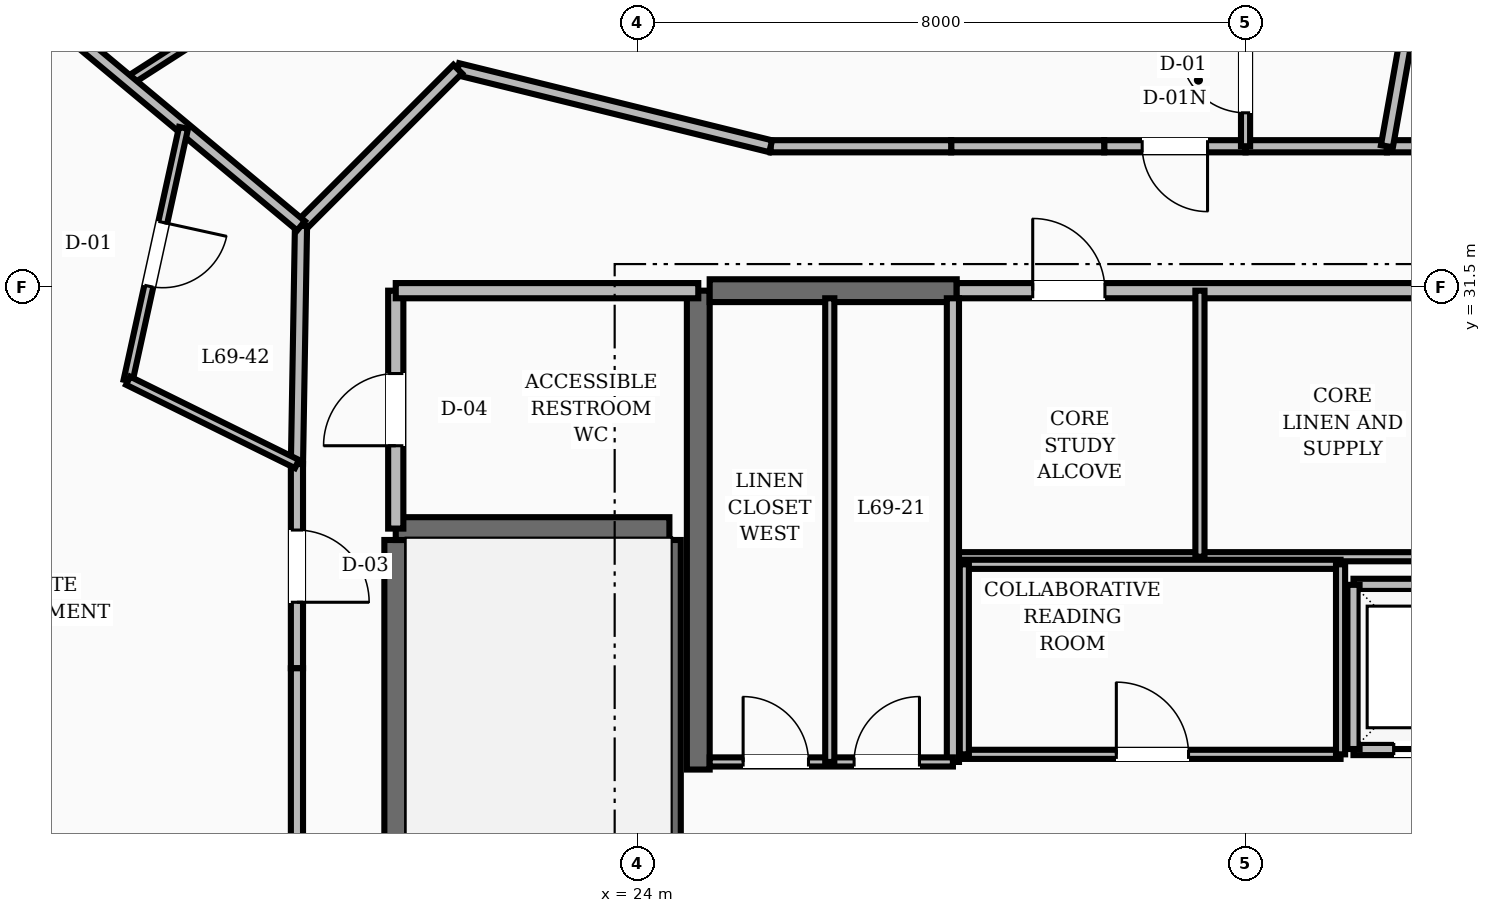
"""IFC4 building model, lengths in metres.
Left out: names, types, materials, properties, quantities, classifications, styles, units other than length and angle.
Written with IfcOpenShell. Run it as: python <this file> out.ifc"""

import sys

from ifc_helpers import new_model, si_unit, direction, frame, frame_2d, origin, place, context, subcontext, project, spatial, rectangle, extrude, element, fill, save


model = new_model("IFC4")
c1 = context("Model", 3, precision=1e-05, world=origin(), true_north=direction((0.0, 1.0)))
c2 = subcontext(c1, "Body", "Model", "MODEL_VIEW")
j1 = project(units=[si_unit("LENGTHUNIT", "METRE"), si_unit("PLANEANGLEUNIT", "RADIAN")], contexts=[c1])
p1 = place(None, origin())
s1 = spatial("IfcSite", under=j1, at=p1, CompositionType="ELEMENT")
p2 = place(p1, origin())
s2 = spatial("IfcBuilding", under=s1, at=p2, CompositionType="ELEMENT")
p3 = place(p2, frame((0.0, 0.0, 265.2)))
s3 = spatial("IfcBuildingStorey", under=s2, at=p3, CompositionType="ELEMENT", Elevation=265.2)
p4 = place(p3, frame((24.8, 25.15, 0.0), z_axis=(0.0, 0.0, 1.0), x_axis=(0.0, 1.0, 0.0)))
e1 = element("IfcWall", 1, at=p4, inside=s3, PredefinedType="SHEAR", context=c2, shape_type="SweptSolid", body=[
    extrude(rectangle(XDim=6.3, YDim=0.3, at=frame_2d((3.15, 0.0))), origin(), (0.0, 0.0, 1.0), 3.6),
])
p5 = place(p3, frame((24.95, 31.45, 0.0), z_axis=(0.0, 0.0, 1.0), x_axis=(1.0, 0.0, 0.0)))
e2 = element("IfcWall", 2, at=p5, inside=s3, PredefinedType="SHEAR", context=c2, shape_type="SweptSolid", body=[
    extrude(rectangle(XDim=3.25, YDim=0.3, at=frame_2d((1.625, 0.0))), origin(), (0.0, 0.0, 1.0), 3.6),
])
for number, where, z_axis, x_axis in (
    (3, (20.82, 19.43, 0.0), (0.0, 0.0, 1.0), (0.0, 1.0, 0.0)),
    (4, (24.42, 19.43, 0.0), (0.0, 0.0, 1.0), (0.0, 1.0, 0.0)),
):
    element("IfcWall", number, at=place(p3, frame(where, z_axis=z_axis, x_axis=x_axis)), inside=s3, PredefinedType="SHEAR", context=c2, shape_type="SweptSolid", body=[
        extrude(rectangle(XDim=8.74, YDim=0.3, at=frame_2d((4.37, 0.0))), origin(), (0.0, 0.0, 1.0), 3.6),
    ])
p6 = place(p3, frame((20.82, 28.32, 0.0), z_axis=(0.0, 0.0, 1.0), x_axis=(1.0, 0.0, 0.0)))
e5 = element("IfcWall", 5, at=p6, inside=s3, PredefinedType="SHEAR", context=c2, shape_type="SweptSolid", body=[
    extrude(rectangle(XDim=3.6, YDim=0.3, at=frame_2d((1.8, 0.0))), origin(), (0.0, 0.0, 1.0), 3.6),
])
p7 = place(p3, frame((20.82, 28.32, 0.0), z_axis=(0.0, 0.0, 1.0), x_axis=(0.0, 1.0, 0.0)))
e6 = element("IfcWall", 6, at=p7, inside=s3, PredefinedType="SOLIDWALL", context=c2, shape_type="SweptSolid", body=[
    extrude(rectangle(XDim=3.13, YDim=0.2, at=frame_2d((1.565, 0.0))), origin(), (0.0, 0.0, 1.0), 2.87),
])
p8 = place(p7, frame((1.09, 0.0, 0.0)))
e7 = element("IfcOpeningElement", 7, at=p8, cuts=e6, PredefinedType="OPENING", context=c2, shape_type="SweptSolid", body=[
    extrude(rectangle(XDim=0.95, YDim=2.1, at=frame_2d((0.475, 1.05))), frame((0.0, 0.11, 0.0), z_axis=(0.0, -1.0, 0.0), x_axis=(1.0, 0.0, 0.0)), (0.0, 0.0, 1.0), 0.22),
])
p9 = place(p3, frame((20.82, 31.45, 0.0), z_axis=(0.0, 0.0, 1.0), x_axis=(1.0, 0.0, 0.0)))
e8 = element("IfcWall", 8, at=p9, inside=s3, PredefinedType="SOLIDWALL", context=c2, shape_type="SweptSolid", body=[
    extrude(rectangle(XDim=3.98, YDim=0.2, at=frame_2d((1.99, 0.0))), origin(), (0.0, 0.0, 1.0), 2.87),
])
p10 = place(p3, frame((33.42, 25.42, 0.0), z_axis=(0.0, 0.0, 1.0), x_axis=(1.0, 0.0, 0.0)))
e9 = element("IfcWall", 9, at=p10, inside=s3, PredefinedType="SOLIDWALL", context=c2, shape_type="SweptSolid", body=[
    extrude(rectangle(XDim=2.16, YDim=0.16, at=frame_2d((1.08, 0.0))), origin(), (0.0, 0.0, 1.0), 2.87),
])
p11 = place(p10, frame((0.53, 0.0, 0.0)))
e10 = element("IfcOpeningElement", 10, at=p11, cuts=e9, PredefinedType="OPENING", context=c2, shape_type="SweptSolid", body=[
    extrude(rectangle(XDim=1.1, YDim=2.15, at=frame_2d((0.55, 1.075))), frame((0.0, 0.09, 0.0), z_axis=(0.0, -1.0, 0.0), x_axis=(1.0, 0.0, 0.0)), (0.0, 0.0, 1.0), 0.18),
])
for number, where, z_axis, x_axis in (
    (11, (33.42, 27.58, 0.0), (0.0, 0.0, 1.0), (1.0, 0.0, 0.0)),
    (12, (33.42, 25.42, 0.0), (0.0, 0.0, 1.0), (0.0, 1.0, 0.0)),
):
    element("IfcWall", number, at=place(p3, frame(where, z_axis=z_axis, x_axis=x_axis)), inside=s3, PredefinedType="SOLIDWALL", context=c2, shape_type="SweptSolid", body=[
        extrude(rectangle(XDim=2.16, YDim=0.16, at=frame_2d((1.08, 0.0))), origin(), (0.0, 0.0, 1.0), 2.87),
    ])
p12 = place(p3, frame((28.2, 31.45, 0.0), z_axis=(0.0, 0.0, 1.0), x_axis=(1.0, 0.0, 0.0)))
e13 = element("IfcWall", 13, at=p12, inside=s3, PredefinedType="SOLIDWALL", context=c2, shape_type="SweptSolid", body=[
    extrude(rectangle(XDim=7.6, YDim=0.2, at=frame_2d((3.8, 0.0))), origin(), (0.0, 0.0, 1.0), 2.87),
])
p13 = place(p12, frame((1.0, 0.0, 0.0)))
e14 = element("IfcOpeningElement", 14, at=p13, cuts=e13, PredefinedType="OPENING", context=c2, shape_type="SweptSolid", body=[
    extrude(rectangle(XDim=0.95, YDim=2.1, at=frame_2d((0.475, 1.05))), frame((0.0, 0.11, 0.0), z_axis=(0.0, -1.0, 0.0), x_axis=(1.0, 0.0, 0.0)), (0.0, 0.0, 1.0), 0.22),
])
p14 = place(p3, frame((28.2, 27.95, 0.0), z_axis=(0.0, 0.0, 1.0), x_axis=(1.0, 0.0, 0.0)))
e15 = element("IfcWall", 15, at=p14, inside=s3, PredefinedType="PARTITIONING", context=c2, shape_type="SweptSolid", body=[
    extrude(rectangle(XDim=7.6, YDim=0.12, at=frame_2d((3.8, 0.0))), origin(), (0.0, 0.0, 1.0), 2.87),
])
p15 = place(p3, frame((31.4, 27.95, 0.0), z_axis=(0.0, 0.0, 1.0), x_axis=(0.0, 1.0, 0.0)))
e16 = element("IfcWall", 16, at=p15, inside=s3, PredefinedType="PARTITIONING", context=c2, shape_type="SweptSolid", body=[
    extrude(rectangle(XDim=3.5, YDim=0.12, at=frame_2d((1.75, 0.0))), origin(), (0.0, 0.0, 1.0), 2.87),
])
p16 = place(p3, frame((28.3, 25.35, 0.0), z_axis=(0.0, 0.0, 1.0), x_axis=(1.0, 0.0, 0.0)))
e17 = element("IfcWall", 17, at=p16, inside=s3, PredefinedType="PARTITIONING", context=c2, shape_type="SweptSolid", body=[
    extrude(rectangle(XDim=4.95, YDim=0.12, at=frame_2d((2.475, 0.0))), origin(), (0.0, 0.0, 1.0), 2.87),
])
p17 = place(p16, frame((2.0, 0.0, 0.0)))
e18 = element("IfcOpeningElement", 18, at=p17, cuts=e17, PredefinedType="OPENING", context=c2, shape_type="SweptSolid", body=[
    extrude(rectangle(XDim=0.95, YDim=2.1, at=frame_2d((0.475, 1.05))), frame((0.0, 0.07, 0.0), z_axis=(0.0, -1.0, 0.0), x_axis=(1.0, 0.0, 0.0)), (0.0, 0.0, 1.0), 0.14),
])
p18 = place(p3, frame((28.3, 27.85, 0.0), z_axis=(0.0, 0.0, 1.0), x_axis=(1.0, 0.0, 0.0)))
e19 = element("IfcWall", 19, at=p18, inside=s3, PredefinedType="PARTITIONING", context=c2, shape_type="SweptSolid", body=[
    extrude(rectangle(XDim=4.95, YDim=0.12, at=frame_2d((2.475, 0.0))), origin(), (0.0, 0.0, 1.0), 2.87),
])
for number, where, z_axis, x_axis in (
    (20, (28.3, 25.35, 0.0), (0.0, 0.0, 1.0), (0.0, 1.0, 0.0)),
    (21, (33.25, 25.35, 0.0), (0.0, 0.0, 1.0), (0.0, 1.0, 0.0)),
):
    element("IfcWall", number, at=place(p3, frame(where, z_axis=z_axis, x_axis=x_axis)), inside=s3, PredefinedType="PARTITIONING", context=c2, shape_type="SweptSolid", body=[
        extrude(rectangle(XDim=2.5, YDim=0.12, at=frame_2d((1.25, 0.0))), origin(), (0.0, 0.0, 1.0), 2.87),
    ])
p19 = place(p3, frame((28.15, 25.25, 0.0), z_axis=(0.0, 0.0, 1.0), x_axis=(0.0, 1.0, 0.0)))
e22 = element("IfcWall", 22, at=p19, inside=s3, PredefinedType="SOLIDWALL", context=c2, shape_type="SweptSolid", body=[
    extrude(rectangle(XDim=6.1, YDim=0.16, at=frame_2d((3.05, 0.0))), origin(), (0.0, 0.0, 1.0), 2.87),
])
p20 = place(p3, frame((24.95, 25.25, 0.0), z_axis=(0.0, 0.0, 1.0), x_axis=(1.0, 0.0, 0.0)))
e23 = element("IfcWall", 23, at=p20, inside=s3, PredefinedType="PARTITIONING", context=c2, shape_type="SweptSolid", body=[
    extrude(rectangle(XDim=3.2, YDim=0.12, at=frame_2d((1.6, 0.0))), origin(), (0.0, 0.0, 1.0), 2.87),
])
p21 = place(p20, frame((0.44, 0.0, 0.0)))
e24 = element("IfcOpeningElement", 24, at=p21, cuts=e23, PredefinedType="OPENING", context=c2, shape_type="SweptSolid", body=[
    extrude(rectangle(XDim=0.86, YDim=2.1, at=frame_2d((0.43, 1.05))), frame((0.0, 0.07, 0.0), z_axis=(0.0, -1.0, 0.0), x_axis=(1.0, 0.0, 0.0)), (0.0, 0.0, 1.0), 0.14),
])
p22 = place(p20, frame((1.9, 0.0, 0.0)))
e25 = element("IfcOpeningElement", 25, at=p22, cuts=e23, PredefinedType="OPENING", context=c2, shape_type="SweptSolid", body=[
    extrude(rectangle(XDim=0.86, YDim=2.1, at=frame_2d((0.43, 1.05))), frame((0.0, 0.07, 0.0), z_axis=(0.0, -1.0, 0.0), x_axis=(1.0, 0.0, 0.0)), (0.0, 0.0, 1.0), 0.14),
])
p23 = place(p3, frame((26.53, 25.25, 0.0), z_axis=(0.0, 0.0, 1.0), x_axis=(0.0, 1.0, 0.0)))
e26 = element("IfcWall", 26, at=p23, inside=s3, PredefinedType="PARTITIONING", context=c2, shape_type="SweptSolid", body=[
    extrude(rectangle(XDim=6.1, YDim=0.12, at=frame_2d((3.05, 0.0))), origin(), (0.0, 0.0, 1.0), 2.87),
])
p24 = place(p3, frame((35.873, 33.35, 0.0), z_axis=(0.0, 0.0, 1.0), x_axis=(-1.0, 0.0, 0.0)))
e27 = element("IfcWall", 27, at=p24, inside=s3, PredefinedType="SOLIDWALL", context=c2, shape_type="SweptSolid", body=[
    extrude(rectangle(XDim=2.013, YDim=0.16, at=frame_2d((1.006, 0.0))), origin(), (0.0, 0.0, 1.0), 2.87),
])
p25 = place(p3, frame((33.86, 33.35, 0.0), z_axis=(0.0, 0.0, 1.0), x_axis=(-1.0, 0.0, 0.0)))
e28 = element("IfcWall", 28, at=p25, inside=s3, PredefinedType="SOLIDWALL", context=c2, shape_type="SweptSolid", body=[
    extrude(rectangle(XDim=1.86, YDim=0.16, at=frame_2d((0.93, 0.0))), origin(), (0.0, 0.0, 1.0), 2.87),
])
p26 = place(p3, frame((32.0, 33.35, 0.0), z_axis=(0.0, 0.0, 1.0), x_axis=(-1.0, 0.0, 0.0)))
e29 = element("IfcWall", 29, at=p26, inside=s3, PredefinedType="SOLIDWALL", context=c2, shape_type="SweptSolid", body=[
    extrude(rectangle(XDim=1.86, YDim=0.16, at=frame_2d((0.93, 0.0))), origin(), (0.0, 0.0, 1.0), 2.87),
])
p27 = place(p26, frame((0.5, 0.0, 0.0)))
e30 = element("IfcOpeningElement", 30, at=p27, cuts=e29, PredefinedType="OPENING", context=c2, shape_type="SweptSolid", body=[
    extrude(rectangle(XDim=0.86, YDim=2.1, at=frame_2d((0.43, 1.05))), frame((0.0, 0.09, 0.0), z_axis=(0.0, -1.0, 0.0), x_axis=(1.0, 0.0, 0.0)), (0.0, 0.0, 1.0), 0.18),
])
p28 = place(p3, frame((30.14, 33.35, 0.0), z_axis=(0.0, 0.0, 1.0), x_axis=(-1.0, 0.0, 0.0)))
e31 = element("IfcWall", 31, at=p28, inside=s3, PredefinedType="SOLIDWALL", context=c2, shape_type="SweptSolid", body=[
    extrude(rectangle(XDim=2.013, YDim=0.16, at=frame_2d((1.006, 0.0))), origin(), (0.0, 0.0, 1.0), 2.87),
])
p29 = place(p3, frame((28.127, 33.35, 0.0), z_axis=(0.0, 0.0, 1.0), x_axis=(-1.0, 0.0, 0.0)))
e32 = element("IfcWall", 32, at=p29, inside=s3, PredefinedType="SOLIDWALL", context=c2, shape_type="SweptSolid", body=[
    extrude(rectangle(XDim=2.375, YDim=0.16, at=frame_2d((1.188, 0.0))), origin(), (0.0, 0.0, 1.0), 2.87),
])
p30 = place(p3, frame((25.752, 33.35, 0.0), z_axis=(0.0, 0.0, 1.0), x_axis=(-0.970939799552, 0.239323850978, 0.0)))
e33 = element("IfcWall", 33, at=p30, inside=s3, PredefinedType="SOLIDWALL", context=c2, shape_type="SweptSolid", body=[
    extrude(rectangle(XDim=4.241, YDim=0.16, at=frame_2d((2.12, 0.0))), origin(), (0.0, 0.0, 1.0), 2.87),
])
p31 = place(p3, frame((21.635, 34.365, 0.0), z_axis=(0.0, 0.0, 1.0), x_axis=(-0.707106781187, -0.707106781187, 0.0)))
e34 = element("IfcWall", 34, at=p31, inside=s3, PredefinedType="SOLIDWALL", context=c2, shape_type="SweptSolid", body=[
    extrude(rectangle(XDim=2.916, YDim=0.16, at=frame_2d((1.458, 0.0))), origin(), (0.0, 0.0, 1.0), 2.87),
])
p32 = place(p3, frame((19.573, 32.303, 0.0), z_axis=(0.0, 0.0, 1.0), x_axis=(-0.016981035134, -0.999855811828, 0.0)))
e35 = element("IfcWall", 35, at=p32, inside=s3, PredefinedType="SOLIDWALL", context=c2, shape_type="SweptSolid", body=[
    extrude(rectangle(XDim=3.134, YDim=0.16, at=frame_2d((1.567, 0.0))), origin(), (0.0, 0.0, 1.0), 2.87),
])
p33 = place(p3, frame((19.52, 29.169, 0.0), z_axis=(0.0, 0.0, 1.0), x_axis=(0.0, -1.0, 0.0)))
e36 = element("IfcWall", 36, at=p33, inside=s3, PredefinedType="SOLIDWALL", context=c2, shape_type="SweptSolid", body=[
    extrude(rectangle(XDim=2.687, YDim=0.16, at=frame_2d((1.344, 0.0))), origin(), (0.0, 0.0, 1.0), 2.87),
])
p34 = place(p33, frame((0.868, 0.0, 0.0)))
e37 = element("IfcOpeningElement", 37, at=p34, cuts=e36, PredefinedType="OPENING", context=c2, shape_type="SweptSolid", body=[
    extrude(rectangle(XDim=0.95, YDim=2.1, at=frame_2d((0.475, 1.05))), frame((0.0, 0.09, 0.0), z_axis=(0.0, -1.0, 0.0), x_axis=(1.0, 0.0, 0.0)), (0.0, 0.0, 1.0), 0.18),
])
p35 = place(p3, frame((19.52, 26.482, 0.0), z_axis=(0.0, 0.0, 1.0), x_axis=(0.0, -1.0, 0.0)))
e38 = element("IfcWall", 38, at=p35, inside=s3, PredefinedType="SOLIDWALL", context=c2, shape_type="SweptSolid", body=[
    extrude(rectangle(XDim=2.482, YDim=0.16, at=frame_2d((1.241, 0.0))), origin(), (0.0, 0.0, 1.0), 2.87),
])
p36 = place(p3, frame((33.86, 33.35, 0.0), z_axis=(0.0, 0.0, 1.0), x_axis=(0.175206916814, 0.984531632961, 0.0)))
e39 = element("IfcWall", 39, at=p36, inside=s3, PredefinedType="SOLIDWALL", context=c2, shape_type="SweptSolid", body=[
    extrude(rectangle(XDim=11.422, YDim=0.16, at=frame_2d((5.711, 0.0))), origin(), (0.0, 0.0, 1.0), 2.87),
])
p37 = place(p3, frame((32.0, 33.35, 0.0), z_axis=(0.0, 0.0, 1.0), x_axis=(0.0, 1.0, 0.0)))
e40 = element("IfcWall", 40, at=p37, inside=s3, PredefinedType="PARTITIONING", context=c2, shape_type="SweptSolid", body=[
    extrude(rectangle(XDim=4.212, YDim=0.12, at=frame_2d((2.106, 0.0))), origin(), (0.0, 0.0, 1.0), 2.87),
])
p38 = place(p37, frame((0.44, 0.0, 0.0)))
e41 = element("IfcOpeningElement", 41, at=p38, cuts=e40, PredefinedType="OPENING", context=c2, shape_type="SweptSolid", body=[
    extrude(rectangle(XDim=0.86, YDim=2.1, at=frame_2d((0.43, 1.05))), frame((0.0, 0.07, 0.0), z_axis=(0.0, -1.0, 0.0), x_axis=(1.0, 0.0, 0.0)), (0.0, 0.0, 1.0), 0.14),
])
p39 = place(p3, frame((23.08, 37.915, 0.0), z_axis=(0.0, 0.0, 1.0), x_axis=(-0.841538391424, -0.540197311878, 0.0)))
e42 = element("IfcWall", 42, at=p39, inside=s3, PredefinedType="PARTITIONING", context=c2, shape_type="SweptSolid", body=[
    extrude(rectangle(XDim=6.873, YDim=0.12, at=frame_2d((3.437, 0.0))), origin(), (0.0, 0.0, 1.0), 2.87),
])
p40 = place(p39, frame((2.961, 0.0, 0.0)))
e43 = element("IfcOpeningElement", 43, at=p40, cuts=e42, PredefinedType="OPENING", context=c2, shape_type="SweptSolid", body=[
    extrude(rectangle(XDim=0.95, YDim=2.1, at=frame_2d((0.475, 1.05))), frame((0.0, 0.07, 0.0), z_axis=(0.0, -1.0, 0.0), x_axis=(1.0, 0.0, 0.0)), (0.0, 0.0, 1.0), 0.14),
])
p41 = place(p3, frame((19.573, 32.303, 0.0), z_axis=(0.0, 0.0, 1.0), x_axis=(-0.76801521487, 0.640431596448, 0.0)))
e44 = element("IfcWall", 44, at=p41, inside=s3, PredefinedType="SOLIDWALL", context=c2, shape_type="SweptSolid", body=[
    extrude(rectangle(XDim=5.245, YDim=0.16, at=frame_2d((2.623, 0.0))), origin(), (0.0, 0.0, 1.0), 2.87),
])
p42 = place(p3, frame((18.028, 33.592, 0.0), z_axis=(0.0, 0.0, 1.0), x_axis=(-0.214325537639, -0.976762286289, 0.0)))
e45 = element("IfcWall", 45, at=p42, inside=s3, PredefinedType="PARTITIONING", context=c2, shape_type="SweptSolid", body=[
    extrude(rectangle(XDim=3.405, YDim=0.12, at=frame_2d((1.702, 0.0))), origin(), (0.0, 0.0, 1.0), 2.87),
])
p43 = place(p42, frame((1.272, 0.0, 0.0)))
e46 = element("IfcOpeningElement", 46, at=p43, cuts=e45, PredefinedType="OPENING", context=c2, shape_type="SweptSolid", body=[
    extrude(rectangle(XDim=0.86, YDim=2.1, at=frame_2d((0.43, 1.05))), frame((0.0, 0.07, 0.0), z_axis=(0.0, -1.0, 0.0), x_axis=(1.0, 0.0, 0.0)), (0.0, 0.0, 1.0), 0.14),
])
p44 = place(p3, frame((19.52, 29.169, 0.0), z_axis=(0.0, 0.0, 1.0), x_axis=(-0.896701601093, 0.442635559572, 0.0)))
e47 = element("IfcWall", 47, at=p44, inside=s3, PredefinedType="PARTITIONING", context=c2, shape_type="SweptSolid", body=[
    extrude(rectangle(XDim=2.478, YDim=0.12, at=frame_2d((1.239, 0.0))), origin(), (0.0, 0.0, 1.0), 2.87),
])
p45 = place(p8, origin())
e48 = element("IfcDoor", 48, at=p45, inside=s3, OperationType="SINGLE_SWING_LEFT", PredefinedType="DOOR", context=c2, shape_type="SweptSolid", body=[
    extrude(rectangle(XDim=0.95, YDim=2.1, at=frame_2d((0.475, 1.05))), frame((0.0, 0.025, 0.0), z_axis=(0.0, -1.0, 0.0), x_axis=(1.0, 0.0, 0.0)), (0.0, 0.0, 1.0), 0.05),
])
fill(e7, e48)
p46 = place(p11, origin())
e49 = element("IfcDoor", 49, at=p46, inside=s3, OperationType="SLIDING_TO_RIGHT", PredefinedType="DOOR", context=c2, shape_type="SweptSolid", body=[
    extrude(rectangle(XDim=1.1, YDim=2.15, at=frame_2d((0.55, 1.075))), frame((0.0, 0.025, 0.0), z_axis=(0.0, -1.0, 0.0), x_axis=(1.0, 0.0, 0.0)), (0.0, 0.0, 1.0), 0.05),
])
fill(e10, e49)
p47 = place(p13, origin())
e50 = element("IfcDoor", 50, at=p47, inside=s3, OperationType="SINGLE_SWING_LEFT", PredefinedType="DOOR", context=c2, shape_type="SweptSolid", body=[
    extrude(rectangle(XDim=0.95, YDim=2.1, at=frame_2d((0.475, 1.05))), frame((0.0, 0.025, 0.0), z_axis=(0.0, -1.0, 0.0), x_axis=(1.0, 0.0, 0.0)), (0.0, 0.0, 1.0), 0.05),
])
fill(e14, e50)
p48 = place(p17, origin())
e51 = element("IfcDoor", 51, at=p48, inside=s3, OperationType="SINGLE_SWING_LEFT", PredefinedType="DOOR", context=c2, shape_type="SweptSolid", body=[
    extrude(rectangle(XDim=0.95, YDim=2.1, at=frame_2d((0.475, 1.05))), frame((0.0, 0.025, 0.0), z_axis=(0.0, -1.0, 0.0), x_axis=(1.0, 0.0, 0.0)), (0.0, 0.0, 1.0), 0.05),
])
fill(e18, e51)
p49 = place(p21, origin())
e52 = element("IfcDoor", 52, at=p49, inside=s3, OperationType="SINGLE_SWING_LEFT", PredefinedType="DOOR", context=c2, shape_type="SweptSolid", body=[
    extrude(rectangle(XDim=0.86, YDim=2.1, at=frame_2d((0.43, 1.05))), frame((0.0, 0.025, 0.0), z_axis=(0.0, -1.0, 0.0), x_axis=(1.0, 0.0, 0.0)), (0.0, 0.0, 1.0), 0.05),
])
fill(e24, e52)
p50 = place(p22, origin())
e53 = element("IfcDoor", 53, at=p50, inside=s3, OperationType="SINGLE_SWING_RIGHT", PredefinedType="DOOR", context=c2, shape_type="SweptSolid", body=[
    extrude(rectangle(XDim=0.86, YDim=2.1, at=frame_2d((0.43, 1.05))), frame((0.0, 0.025, 0.0), z_axis=(0.0, -1.0, 0.0), x_axis=(1.0, 0.0, 0.0)), (0.0, 0.0, 1.0), 0.05),
])
fill(e25, e53)
p51 = place(p38, origin())
e54 = element("IfcDoor", 54, at=p51, inside=s3, OperationType="SINGLE_SWING_RIGHT", PredefinedType="DOOR", context=c2, shape_type="SweptSolid", body=[
    extrude(rectangle(XDim=0.86, YDim=2.1, at=frame_2d((0.43, 1.05))), frame((0.0, 0.025, 0.0), z_axis=(0.0, -1.0, 0.0), x_axis=(1.0, 0.0, 0.0)), (0.0, 0.0, 1.0), 0.05),
])
fill(e41, e54)
p52 = place(p27, origin())
e55 = element("IfcDoor", 55, at=p52, inside=s3, OperationType="SINGLE_SWING_LEFT", PredefinedType="DOOR", context=c2, shape_type="SweptSolid", body=[
    extrude(rectangle(XDim=0.86, YDim=2.1, at=frame_2d((0.43, 1.05))), frame((0.0, 0.025, 0.0), z_axis=(0.0, -1.0, 0.0), x_axis=(1.0, 0.0, 0.0)), (0.0, 0.0, 1.0), 0.05),
])
fill(e30, e55)
p53 = place(p43, origin())
e56 = element("IfcDoor", 56, at=p53, inside=s3, OperationType="SINGLE_SWING_LEFT", PredefinedType="DOOR", context=c2, shape_type="SweptSolid", body=[
    extrude(rectangle(XDim=0.86, YDim=2.1, at=frame_2d((0.43, 1.05))), frame((0.0, 0.025, 0.0), z_axis=(0.0, -1.0, 0.0), x_axis=(1.0, 0.0, 0.0)), (0.0, 0.0, 1.0), 0.05),
])
fill(e46, e56)
p54 = place(p34, origin())
e57 = element("IfcDoor", 57, at=p54, inside=s3, OperationType="SINGLE_SWING_RIGHT", PredefinedType="DOOR", context=c2, shape_type="SweptSolid", body=[
    extrude(rectangle(XDim=0.95, YDim=2.1, at=frame_2d((0.475, 1.05))), frame((0.0, 0.025, 0.0), z_axis=(0.0, -1.0, 0.0), x_axis=(1.0, 0.0, 0.0)), (0.0, 0.0, 1.0), 0.05),
])
fill(e37, e57)
save(model, sys.argv[1])
